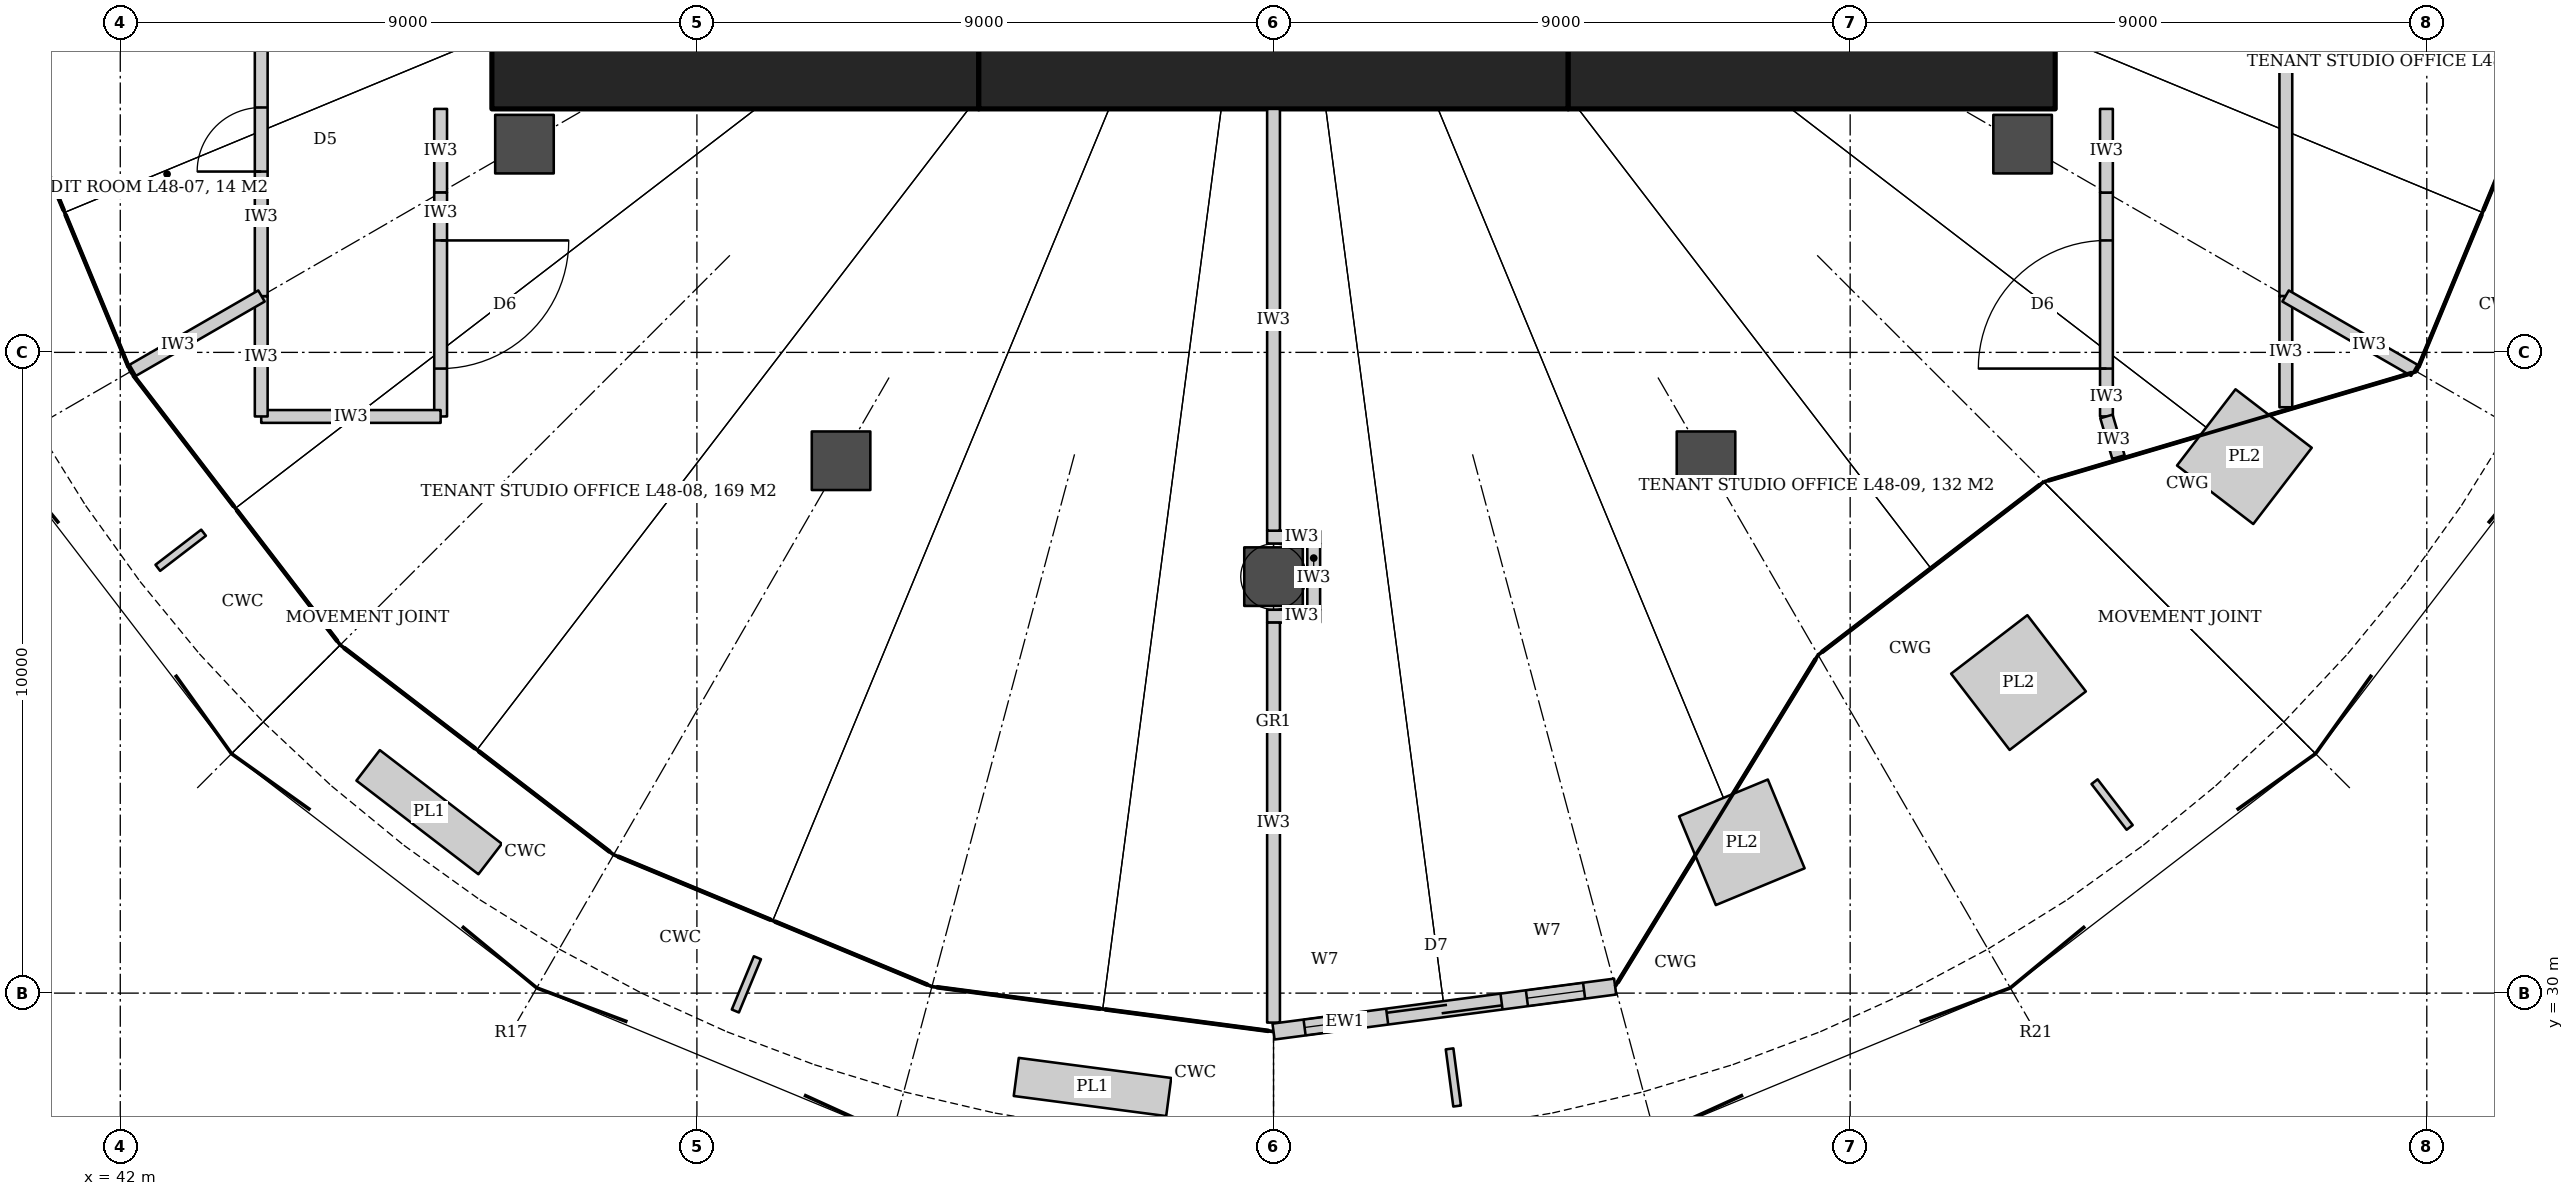
"""IFC4 building model, lengths in metres.
Left out: names, types, materials, properties, quantities, classifications, styles, units other than length and angle.
Written with IfcOpenShell. Run it as: python <this file> out.ifc"""

import sys

from ifc_helpers import new_model, si_unit, direction, frame, frame_2d, origin, origin_2d, place, context, subcontext, project, spatial, rectangle, hollow_circle, extrude, element, fill, save


model = new_model("IFC4")
c1 = context("Model", 3, precision=1e-05, world=origin(), true_north=direction((0.0, 1.0)))
c2 = subcontext(c1, "Body", "Model", "MODEL_VIEW")
j1 = project(units=[si_unit("LENGTHUNIT", "METRE"), si_unit("PLANEANGLEUNIT", "RADIAN")], contexts=[c1])
p1 = place(None, origin())
s1 = spatial("IfcSite", under=j1, at=p1, CompositionType="ELEMENT")
p2 = place(p1, origin())
s2 = spatial("IfcBuilding", under=s1, at=p2, CompositionType="ELEMENT")
p3 = place(p2, frame((0.0, 0.0, 202.4)))
s3 = spatial("IfcBuildingStorey", under=s2, at=p3, CompositionType="ELEMENT", Elevation=202.4)
p4 = place(p3, frame((47.8, 44.55, 0.0), z_axis=(0.0, 0.0, 1.0), x_axis=(1.0, 0.0, 0.0)))
e1 = element("IfcWall", 1, at=p4, inside=s3, PredefinedType="SHEAR", context=c2, shape_type="SweptSolid", body=[
    extrude(rectangle(XDim=7.6, YDim=1.5, at=frame_2d((3.8, 0.0))), origin(), (0.0, 0.0, 1.0), 4.2),
])
p5 = place(p3, frame((55.4, 44.55, 0.0), z_axis=(0.0, 0.0, 1.0), x_axis=(1.0, 0.0, 0.0)))
e2 = element("IfcWall", 2, at=p5, inside=s3, PredefinedType="SHEAR", context=c2, shape_type="SweptSolid", body=[
    extrude(rectangle(XDim=9.2, YDim=1.5, at=frame_2d((4.6, 0.0))), origin(), (0.0, 0.0, 1.0), 4.2),
])
p6 = place(p3, frame((64.6, 44.55, 0.0), z_axis=(0.0, 0.0, 1.0), x_axis=(1.0, 0.0, 0.0)))
e3 = element("IfcWall", 3, at=p6, inside=s3, PredefinedType="SHEAR", context=c2, shape_type="SweptSolid", body=[
    extrude(rectangle(XDim=7.6, YDim=1.5, at=frame_2d((3.8, 0.0))), origin(), (0.0, 0.0, 1.0), 4.2),
])
for number, where, z_axis, x_axis in (
    (4, (48.309, 43.25, 0.0), (0.0, 0.0, 1.0), (1.0, 0.0, 0.0)),
    (5, (53.25, 38.309, 0.0), (0.0, 0.0, 1.0), (1.0, 0.0, 0.0)),
    (6, (60.0, 36.5, 0.0), (0.0, 0.0, 1.0), (1.0, 0.0, 0.0)),
    (7, (66.75, 38.309, 0.0), (0.0, 0.0, 1.0), (1.0, 0.0, 0.0)),
    (8, (71.691, 43.25, 0.0), (0.0, 0.0, 1.0), (1.0, 0.0, 0.0)),
):
    element("IfcColumn", number, at=place(p3, frame(where, z_axis=z_axis, x_axis=x_axis)), inside=s3, PredefinedType="COLUMN", context=c2, shape_type="SweptSolid", body=[
        extrude(hollow_circle(Radius=0.457, WallThickness=0.045, at=origin_2d()), origin(), (0.0, 0.0, 1.0), 4.2),
    ])
p7 = place(p3, frame((75.8, 50.0, 0.0), z_axis=(0.0, 0.0, 1.0), x_axis=(0.0, -1.0, 0.0)))
e9 = element("IfcWall", 9, at=p7, inside=s3, PredefinedType="PARTITIONING", context=c2, shape_type="SweptSolid", body=[
    extrude(rectangle(XDim=9.122, YDim=0.2, at=frame_2d((4.561, 0.0))), origin(), (0.0, 0.0, 1.0), 3.012),
])
p8 = place(p7, frame((4.061, 0.0, 0.0)))
e10 = element("IfcOpeningElement", 10, at=p8, cuts=e9, PredefinedType="OPENING", context=c2, shape_type="SweptSolid", body=[
    extrude(rectangle(XDim=1.0, YDim=2.1, at=frame_2d((0.5, 1.05))), frame((0.0, 0.11, 0.0), z_axis=(0.0, -1.0, 0.0), x_axis=(1.0, 0.0, 0.0)), (0.0, 0.0, 1.0), 0.22),
])
p9 = place(p3, frame((75.8, 40.878, 0.0), z_axis=(0.0, 0.0, 1.0), x_axis=(0.0, -1.0, 0.0)))
e11 = element("IfcWall", 11, at=p9, inside=s3, PredefinedType="PARTITIONING", context=c2, shape_type="SweptSolid", body=[
    extrude(rectangle(XDim=1.878, YDim=0.2, at=frame_2d((0.939, 0.0))), origin(), (0.0, 0.0, 1.0), 3.012),
])
p10 = place(p3, frame((75.8, 39.0, 0.0), z_axis=(0.0, 0.0, 1.0), x_axis=(-1.0, 0.0, 0.0)))
e12 = element("IfcWall", 12, at=p10, inside=s3, PredefinedType="PARTITIONING", context=c2, shape_type="SweptSolid", body=[
    extrude(rectangle(XDim=2.8, YDim=0.2, at=frame_2d((1.4, 0.0))), origin(), (0.0, 0.0, 1.0), 3.04),
])
p11 = place(p3, frame((73.0, 39.0, 0.0), z_axis=(0.0, 0.0, 1.0), x_axis=(0.0, 1.0, 0.0)))
e13 = element("IfcWall", 13, at=p11, inside=s3, PredefinedType="PARTITIONING", context=c2, shape_type="SweptSolid", body=[
    extrude(rectangle(XDim=3.494, YDim=0.2, at=frame_2d((1.747, 0.0))), origin(), (0.0, 0.0, 1.0), 3.012),
])
p12 = place(p11, frame((0.747, 0.0, 0.0)))
e14 = element("IfcOpeningElement", 14, at=p12, cuts=e13, PredefinedType="OPENING", context=c2, shape_type="SweptSolid", body=[
    extrude(rectangle(XDim=2.0, YDim=2.1, at=frame_2d((1.0, 1.05))), frame((0.0, 0.11, 0.0), z_axis=(0.0, -1.0, 0.0), x_axis=(1.0, 0.0, 0.0)), (0.0, 0.0, 1.0), 0.22),
])
for number, where, z_axis, x_axis in (
    (15, (73.0, 42.494, 0.0), (0.0, 0.0, 1.0), (0.0, 1.0, 0.0)),
    (16, (47.0, 43.8, 0.0), (0.0, 0.0, 1.0), (0.0, -1.0, 0.0)),
):
    element("IfcWall", number, at=place(p3, frame(where, z_axis=z_axis, x_axis=x_axis)), inside=s3, PredefinedType="PARTITIONING", context=c2, shape_type="SweptSolid", body=[
        extrude(rectangle(XDim=1.306, YDim=0.2, at=frame_2d((0.653, 0.0))), origin(), (0.0, 0.0, 1.0), 3.012),
    ])
p13 = place(p3, frame((47.0, 42.494, 0.0), z_axis=(0.0, 0.0, 1.0), x_axis=(0.0, -1.0, 0.0)))
e17 = element("IfcWall", 17, at=p13, inside=s3, PredefinedType="PARTITIONING", context=c2, shape_type="SweptSolid", body=[
    extrude(rectangle(XDim=3.494, YDim=0.2, at=frame_2d((1.747, 0.0))), origin(), (0.0, 0.0, 1.0), 3.012),
])
p14 = place(p13, frame((0.747, 0.0, 0.0)))
e18 = element("IfcOpeningElement", 18, at=p14, cuts=e17, PredefinedType="OPENING", context=c2, shape_type="SweptSolid", body=[
    extrude(rectangle(XDim=2.0, YDim=2.1, at=frame_2d((1.0, 1.05))), frame((0.0, 0.11, 0.0), z_axis=(0.0, -1.0, 0.0), x_axis=(1.0, 0.0, 0.0)), (0.0, 0.0, 1.0), 0.22),
])
p15 = place(p3, frame((47.0, 39.0, 0.0), z_axis=(0.0, 0.0, 1.0), x_axis=(-1.0, 0.0, 0.0)))
e19 = element("IfcWall", 19, at=p15, inside=s3, PredefinedType="PARTITIONING", context=c2, shape_type="SweptSolid", body=[
    extrude(rectangle(XDim=2.8, YDim=0.2, at=frame_2d((1.4, 0.0))), origin(), (0.0, 0.0, 1.0), 3.04),
])
p16 = place(p3, frame((44.2, 39.0, 0.0), z_axis=(0.0, 0.0, 1.0), x_axis=(0.0, 1.0, 0.0)))
e20 = element("IfcWall", 20, at=p16, inside=s3, PredefinedType="PARTITIONING", context=c2, shape_type="SweptSolid", body=[
    extrude(rectangle(XDim=1.878, YDim=0.2, at=frame_2d((0.939, 0.0))), origin(), (0.0, 0.0, 1.0), 3.012),
])
p17 = place(p3, frame((44.2, 40.878, 0.0), z_axis=(0.0, 0.0, 1.0), x_axis=(0.0, 1.0, 0.0)))
e21 = element("IfcWall", 21, at=p17, inside=s3, PredefinedType="PARTITIONING", context=c2, shape_type="SweptSolid", body=[
    extrude(rectangle(XDim=4.888, YDim=0.2, at=frame_2d((2.444, 0.0))), origin(), (0.0, 0.0, 1.0), 3.012),
])
p18 = place(p17, frame((1.944, 0.0, 0.0)))
e22 = element("IfcOpeningElement", 22, at=p18, cuts=e21, PredefinedType="OPENING", context=c2, shape_type="SweptSolid", body=[
    extrude(rectangle(XDim=1.0, YDim=2.1, at=frame_2d((0.5, 1.05))), frame((0.0, 0.11, 0.0), z_axis=(0.0, -1.0, 0.0), x_axis=(1.0, 0.0, 0.0)), (0.0, 0.0, 1.0), 0.22),
])
p19 = place(p3, frame((44.198, 45.766, 0.0), z_axis=(0.0, 0.0, 1.0), x_axis=(-0.96593251702, -0.258794073665, 0.0)))
e23 = element("IfcWall", 23, at=p19, inside=s3, PredefinedType="PARTITIONING", context=c2, shape_type="SweptSolid", body=[
    extrude(rectangle(XDim=4.7, YDim=0.2, at=frame_2d((2.35, 0.0))), origin(), (0.0, 0.0, 1.0), 3.012),
])
p20 = place(p3, frame((44.204, 40.88, 0.0), z_axis=(0.0, 0.0, 1.0), x_axis=(-0.866032430508, -0.49998782916, 0.0)))
e24 = element("IfcWall", 24, at=p20, inside=s3, PredefinedType="PARTITIONING", context=c2, shape_type="SweptSolid", body=[
    extrude(rectangle(XDim=2.92, YDim=0.2, at=frame_2d((1.46, 0.0))), origin(), (0.0, 0.0, 1.0), 3.012),
])
for number, where, z_axis, x_axis in (
    (25, (59.9, 37.117, 0.0), (0.0, 0.0, 1.0), (1.0, 0.0, 0.0)),
    (26, (59.9, 35.883, 0.0), (0.0, 0.0, 1.0), (1.0, 0.0, 0.0)),
):
    element("IfcWall", number, at=place(p3, frame(where, z_axis=z_axis, x_axis=x_axis)), inside=s3, PredefinedType="PARTITIONING", context=c2, shape_type="SweptSolid", body=[
        extrude(rectangle(XDim=0.827, YDim=0.2, at=frame_2d((0.414, 0.0))), origin(), (0.0, 0.0, 1.0), 3.012),
    ])
p21 = place(p3, frame((60.627, 37.017, 0.0), z_axis=(0.0, 0.0, 1.0), x_axis=(0.0, -1.0, 0.0)))
e27 = element("IfcWall", 27, at=p21, inside=s3, PredefinedType="PARTITIONING", context=c2, shape_type="SweptSolid", body=[
    extrude(rectangle(XDim=1.034, YDim=0.2, at=frame_2d((0.517, 0.0))), origin(), (0.0, 0.0, 1.0), 3.012),
])
p22 = place(p3, frame((60.0, 43.8, 0.0), z_axis=(0.0, 0.0, 1.0), x_axis=(0.0, -1.0, 0.0)))
e28 = element("IfcWall", 28, at=p22, inside=s3, PredefinedType="PARTITIONING", context=c2, shape_type="SweptSolid", body=[
    extrude(rectangle(XDim=6.583, YDim=0.2, at=frame_2d((3.292, 0.0))), origin(), (0.0, 0.0, 1.0), 3.04),
])
p23 = place(p3, frame((60.0, 35.783, 0.0), z_axis=(0.0, 0.0, 1.0), x_axis=(0.0, -1.0, 0.0)))
e29 = element("IfcWall", 29, at=p23, inside=s3, PredefinedType="PARTITIONING", context=c2, shape_type="SweptSolid", body=[
    extrude(rectangle(XDim=6.843, YDim=0.2, at=frame_2d((3.421, 0.0))), origin(), (0.0, 0.0, 1.0), 3.012),
])
p24 = place(p3, frame((75.796, 40.88, 0.0), z_axis=(0.0, 0.0, 1.0), x_axis=(0.866032430508, -0.49998782916, 0.0)))
e30 = element("IfcWall", 30, at=p24, inside=s3, PredefinedType="PARTITIONING", context=c2, shape_type="SweptSolid", body=[
    extrude(rectangle(XDim=2.92, YDim=0.2, at=frame_2d((1.46, 0.0))), origin(), (0.0, 0.0, 1.0), 3.012),
])
p25 = place(p3, frame((60.0, 28.8, 0.0), z_axis=(0.0, 0.0, 1.0), x_axis=(0.991444232742, 0.130530967061, 0.0)))
e31 = element("IfcWall", 31, at=p25, inside=s3, PredefinedType="SOLIDWALL", context=c2, shape_type="SweptSolid", body=[
    extrude(rectangle(XDim=5.534, YDim=0.25, at=frame_2d((2.767, 0.0))), origin(), (0.0, 0.0, 1.0), 4.04),
])
p26 = place(p25, frame((1.867, 0.0, 0.0)))
e32 = element("IfcOpeningElement", 32, at=p26, cuts=e31, PredefinedType="OPENING", context=c2, shape_type="SweptSolid", body=[
    extrude(rectangle(XDim=1.8, YDim=2.4, at=frame_2d((0.9, 1.2))), frame((0.0, 0.135, 0.0), z_axis=(0.0, -1.0, 0.0), x_axis=(1.0, 0.0, 0.0)), (0.0, 0.0, 1.0), 0.27),
])
p27 = place(p25, frame((0.267, 0.0, 0.0)))
e33 = element("IfcOpeningElement", 33, at=p27, cuts=e31, PredefinedType="OPENING", context=c2, shape_type="SweptSolid", body=[
    extrude(rectangle(XDim=1.2, YDim=2.4, at=frame_2d((0.6, 1.2))), frame((0.0, 0.135, 0.0), z_axis=(0.0, -1.0, 0.0), x_axis=(1.0, 0.0, 0.0)), (0.0, 0.0, 1.0), 0.27),
])
p28 = place(p25, frame((4.067, 0.0, 0.0)))
e34 = element("IfcOpeningElement", 34, at=p28, cuts=e31, PredefinedType="OPENING", context=c2, shape_type="SweptSolid", body=[
    extrude(rectangle(XDim=1.2, YDim=2.4, at=frame_2d((0.6, 1.2))), frame((0.0, 0.135, 0.0), z_axis=(0.0, -1.0, 0.0), x_axis=(1.0, 0.0, 0.0)), (0.0, 0.0, 1.0), 0.27),
])
p29 = place(p18, origin())
e35 = element("IfcDoor", 35, at=p29, inside=s3, OperationType="SINGLE_SWING_LEFT", PredefinedType="DOOR", context=c2, shape_type="SweptSolid", body=[
    extrude(rectangle(XDim=1.0, YDim=2.1, at=frame_2d((0.5, 1.05))), frame((0.0, 0.025, 0.0), z_axis=(0.0, -1.0, 0.0), x_axis=(1.0, 0.0, 0.0)), (0.0, 0.0, 1.0), 0.05),
])
fill(e22, e35)
p30 = place(p14, origin())
e36 = element("IfcDoor", 36, at=p30, inside=s3, OperationType="DOUBLE_DOOR_DOUBLE_SWING", PredefinedType="DOOR", context=c2, shape_type="SweptSolid", body=[
    extrude(rectangle(XDim=2.0, YDim=2.1, at=frame_2d((1.0, 1.05))), frame((0.0, 0.025, 0.0), z_axis=(0.0, -1.0, 0.0), x_axis=(1.0, 0.0, 0.0)), (0.0, 0.0, 1.0), 0.05),
])
fill(e18, e36)
p31 = place(p12, origin())
e37 = element("IfcDoor", 37, at=p31, inside=s3, OperationType="DOUBLE_DOOR_DOUBLE_SWING", PredefinedType="DOOR", context=c2, shape_type="SweptSolid", body=[
    extrude(rectangle(XDim=2.0, YDim=2.1, at=frame_2d((1.0, 1.05))), frame((0.0, 0.025, 0.0), z_axis=(0.0, -1.0, 0.0), x_axis=(1.0, 0.0, 0.0)), (0.0, 0.0, 1.0), 0.05),
])
fill(e14, e37)
p32 = place(p26, origin())
e38 = element("IfcDoor", 38, at=p32, inside=s3, OperationType="DOUBLE_DOOR_SLIDING", PredefinedType="DOOR", context=c2, shape_type="SweptSolid", body=[
    extrude(rectangle(XDim=1.8, YDim=2.4, at=frame_2d((0.9, 1.2))), frame((0.0, 0.025, 0.0), z_axis=(0.0, -1.0, 0.0), x_axis=(1.0, 0.0, 0.0)), (0.0, 0.0, 1.0), 0.05),
])
fill(e32, e38)
p33 = place(p27, origin())
e39 = element("IfcWindow", 39, at=p33, inside=s3, PartitioningType="SINGLE_PANEL", PredefinedType="WINDOW", context=c2, shape_type="SweptSolid", body=[
    extrude(rectangle(XDim=1.2, YDim=2.4, at=frame_2d((0.6, 1.2))), frame((0.0, 0.03, 0.0), z_axis=(0.0, -1.0, 0.0), x_axis=(1.0, 0.0, 0.0)), (0.0, 0.0, 1.0), 0.06),
])
fill(e33, e39)
p34 = place(p28, origin())
e40 = element("IfcWindow", 40, at=p34, inside=s3, PartitioningType="SINGLE_PANEL", PredefinedType="WINDOW", context=c2, shape_type="SweptSolid", body=[
    extrude(rectangle(XDim=1.2, YDim=2.4, at=frame_2d((0.6, 1.2))), frame((0.0, 0.03, 0.0), z_axis=(0.0, -1.0, 0.0), x_axis=(1.0, 0.0, 0.0)), (0.0, 0.0, 1.0), 0.06),
])
fill(e34, e40)
save(model, sys.argv[1])
